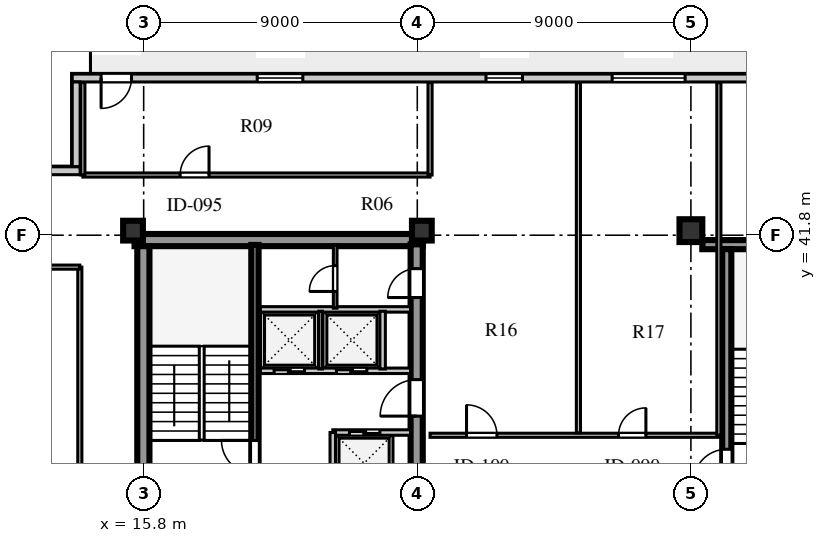
"""IFC4 building model, lengths in metres.
Left out: names, types, materials, properties, quantities, classifications, styles, units other than length and angle.
Written with IfcOpenShell. Run it as: python <this file> out.ifc"""

import sys

from ifc_helpers import new_model, si_unit, direction, frame, frame_2d, origin, origin_2d, place, context, subcontext, project, spatial, rectangle, extrude, element, fill, save


model = new_model("IFC4")
c1 = context("Model", 3, precision=1e-05, world=origin(), true_north=direction((0.0, 1.0)))
c2 = subcontext(c1, "Body", "Model", "MODEL_VIEW")
j1 = project(units=[si_unit("LENGTHUNIT", "METRE"), si_unit("PLANEANGLEUNIT", "RADIAN")], contexts=[c1])
p1 = place(None, origin())
s1 = spatial("IfcSite", under=j1, at=p1, CompositionType="ELEMENT")
p2 = place(p1, origin())
s2 = spatial("IfcBuilding", under=s1, at=p2, CompositionType="ELEMENT")
p3 = place(p2, frame((0.0, 0.0, 296.0)))
s3 = spatial("IfcBuildingStorey", under=s2, at=p3, CompositionType="ELEMENT", Elevation=296.0)
p4 = place(p3, frame((15.5, 41.64, 0.0), z_axis=(0.0, 0.0, 1.0), x_axis=(1.0, 0.0, 0.0)))
e1 = element("IfcWall", 1, at=p4, inside=s3, PredefinedType="SHEAR", context=c2, shape_type="SweptSolid", body=[
    extrude(rectangle(XDim=9.48, YDim=0.4, at=frame_2d((4.74, 0.0))), origin(), (0.0, 0.0, 1.0), 3.66),
])
p5 = place(p3, frame((15.79, 15.81, 0.0), z_axis=(0.0, 0.0, 1.0), x_axis=(0.0, 1.0, 0.0)))
e2 = element("IfcWall", 2, at=p5, inside=s3, PredefinedType="SHEAR", context=c2, shape_type="SweptSolid", body=[
    extrude(rectangle(XDim=25.63, YDim=0.4, at=frame_2d((12.815, 0.0))), origin(), (0.0, 0.0, 1.0), 3.66),
])
p6 = place(p3, frame((24.78, 15.74, 0.0), z_axis=(0.0, 0.0, 1.0), x_axis=(0.0, 1.0, 0.0)))
e3 = element("IfcWall", 3, at=p6, inside=s3, PredefinedType="SHEAR", context=c2, shape_type="SweptSolid", body=[
    extrude(rectangle(XDim=25.76, YDim=0.4, at=frame_2d((12.88, 0.0))), origin(), (0.0, 0.0, 1.0), 3.66),
])
p7 = place(p6, frame((1.61, 0.0, 0.0)))
e4 = element("IfcOpeningElement", 4, at=p7, cuts=e3, PredefinedType="OPENING", context=c2, shape_type="SweptSolid", body=[
    extrude(rectangle(XDim=1.2, YDim=2.1, at=frame_2d((0.6, 1.05))), frame((0.0, 0.21, 0.0), z_axis=(0.0, -1.0, 0.0), x_axis=(1.0, 0.0, 0.0)), (0.0, 0.0, 1.0), 0.42),
])
p8 = place(p6, frame((6.78, 0.0, 0.0)))
e5 = element("IfcOpeningElement", 5, at=p8, cuts=e3, PredefinedType="OPENING", context=c2, shape_type="SweptSolid", body=[
    extrude(rectangle(XDim=0.85, YDim=2.06, at=frame_2d((0.425, 1.03))), frame((0.0, 0.21, 0.0), z_axis=(0.0, -1.0, 0.0), x_axis=(1.0, 0.0, 0.0)), (0.0, 0.0, 1.0), 0.42),
])
p9 = place(p6, frame((12.11, 0.0, 0.0)))
e6 = element("IfcOpeningElement", 6, at=p9, cuts=e3, PredefinedType="OPENING", context=c2, shape_type="SweptSolid", body=[
    extrude(rectangle(XDim=1.5, YDim=2.12, at=frame_2d((0.75, 1.06))), frame((0.0, 0.21, 0.0), z_axis=(0.0, -1.0, 0.0), x_axis=(1.0, 0.0, 0.0)), (0.0, 0.0, 1.0), 0.42),
])
p10 = place(p6, frame((20.11, 0.0, 0.0)))
e7 = element("IfcOpeningElement", 7, at=p10, cuts=e3, PredefinedType="OPENING", context=c2, shape_type="SweptSolid", body=[
    extrude(rectangle(XDim=1.2, YDim=2.12, at=frame_2d((0.6, 1.06))), frame((0.0, 0.21, 0.0), z_axis=(0.0, -1.0, 0.0), x_axis=(1.0, 0.0, 0.0)), (0.0, 0.0, 1.0), 0.42),
])
p11 = place(p6, frame((24.01, 0.0, 0.0)))
e8 = element("IfcOpeningElement", 8, at=p11, cuts=e3, PredefinedType="OPENING", context=c2, shape_type="SweptSolid", body=[
    extrude(rectangle(XDim=0.95, YDim=2.1, at=frame_2d((0.475, 1.05))), frame((0.0, 0.21, 0.0), z_axis=(0.0, -1.0, 0.0), x_axis=(1.0, 0.0, 0.0)), (0.0, 0.0, 1.0), 0.42),
])
p12 = place(p3, frame((34.175, 41.49, 0.0), z_axis=(0.0, 0.0, 1.0), x_axis=(1.0, 0.0, 0.0)))
e9 = element("IfcWall", 9, at=p12, inside=s3, PredefinedType="SHEAR", context=c2, shape_type="SweptSolid", body=[
    extrude(rectangle(XDim=4.695, YDim=0.3, at=frame_2d((2.348, 0.0))), origin(), (0.0, 0.0, 1.0), 3.66),
])
p13 = place(p3, frame((34.98, 33.31, 0.0), z_axis=(0.0, 0.0, 1.0), x_axis=(0.0, 1.0, 0.0)))
e10 = element("IfcWall", 10, at=p13, inside=s3, PredefinedType="SHEAR", context=c2, shape_type="SweptSolid", body=[
    extrude(rectangle(XDim=8.03, YDim=0.3, at=frame_2d((4.015, 0.0))), origin(), (0.0, 0.0, 1.0), 3.66),
])
p14 = place(p13, frame((0.35, 0.0, 0.0)))
e11 = element("IfcOpeningElement", 11, at=p14, cuts=e10, PredefinedType="OPENING", context=c2, shape_type="SweptSolid", body=[
    extrude(rectangle(XDim=1.1, YDim=2.1, at=frame_2d((0.55, 1.05))), frame((0.0, 0.16, 0.0), z_axis=(0.0, -1.0, 0.0), x_axis=(1.0, 0.0, 0.0)), (0.0, 0.0, 1.0), 0.32),
])
for number, where, z_axis, x_axis in (
    (12, (15.45, 41.95, 0.0), (0.0, 0.0, 1.0), (1.0, 0.0, 0.0)),
    (13, (24.95, 41.95, 0.0), (0.0, 0.0, 1.0), (1.0, 0.0, 0.0)),
):
    element("IfcColumn", number, at=place(p3, frame(where, z_axis=z_axis, x_axis=x_axis)), inside=s3, PredefinedType="COLUMN", context=c2, shape_type="SweptSolid", body=[
        extrude(rectangle(XDim=0.65, YDim=0.65, at=origin_2d()), origin(), (0.0, 0.0, 1.0), 3.66),
    ])
p15 = place(p3, frame((33.8, 41.95, 0.0), z_axis=(0.0, 0.0, 1.0), x_axis=(1.0, 0.0, 0.0)))
e14 = element("IfcColumn", 14, at=p15, inside=s3, PredefinedType="COLUMN", context=c2, shape_type="SweptSolid", body=[
    extrude(rectangle(XDim=0.75, YDim=0.75, at=origin_2d()), origin(), (0.0, 0.0, 1.0), 3.66),
])
p16 = place(p3, frame((45.15, 46.97, 0.0), z_axis=(0.0, 0.0, 1.0), x_axis=(-1.0, 0.0, 0.0)))
e15 = element("IfcWall", 15, at=p16, inside=s3, PredefinedType="SOLIDWALL", context=c2, shape_type="SweptSolid", body=[
    extrude(rectangle(XDim=31.7, YDim=0.26, at=frame_2d((15.85, 0.0))), origin(), (0.0, 0.0, 1.0), 3.66),
])
p17 = place(p16, frame((29.75, 0.0, 0.0)))
e16 = element("IfcOpeningElement", 16, at=p17, cuts=e15, PredefinedType="OPENING", context=c2, shape_type="SweptSolid", body=[
    extrude(rectangle(XDim=1.0, YDim=2.05, at=frame_2d((0.5, 1.025))), frame((0.0, 0.14, 0.0), z_axis=(0.0, -1.0, 0.0), x_axis=(1.0, 0.0, 0.0)), (0.0, 0.0, 1.0), 0.28),
])
p18 = place(p16, frame((24.115, 0.0, 0.8)))
e17 = element("IfcOpeningElement", 17, at=p18, cuts=e15, PredefinedType="OPENING", context=c2, shape_type="SweptSolid", body=[
    extrude(rectangle(XDim=1.5, YDim=2.0, at=frame_2d((0.75, 1.0))), frame((0.0, 0.14, 0.0), z_axis=(0.0, -1.0, 0.0), x_axis=(1.0, 0.0, 0.0)), (0.0, 0.0, 1.0), 0.28),
])
p19 = place(p16, frame((16.89, 0.0, 0.8)))
e18 = element("IfcOpeningElement", 18, at=p19, cuts=e15, PredefinedType="OPENING", context=c2, shape_type="SweptSolid", body=[
    extrude(rectangle(XDim=1.2, YDim=1.75, at=frame_2d((0.6, 0.875))), frame((0.0, 0.14, 0.0), z_axis=(0.0, -1.0, 0.0), x_axis=(1.0, 0.0, 0.0)), (0.0, 0.0, 1.0), 0.28),
])
p20 = place(p16, frame((11.54, 0.0, 0.8)))
e19 = element("IfcOpeningElement", 19, at=p20, cuts=e15, PredefinedType="OPENING", context=c2, shape_type="SweptSolid", body=[
    extrude(rectangle(XDim=2.4, YDim=2.05, at=frame_2d((1.2, 1.025))), frame((0.0, 0.14, 0.0), z_axis=(0.0, -1.0, 0.0), x_axis=(1.0, 0.0, 0.0)), (0.0, 0.0, 1.0), 0.28),
])
p21 = place(p16, frame((4.22, 0.0, 0.8)))
e20 = element("IfcOpeningElement", 20, at=p21, cuts=e15, PredefinedType="OPENING", context=c2, shape_type="SweptSolid", body=[
    extrude(rectangle(XDim=2.1, YDim=1.95, at=frame_2d((1.05, 0.975))), frame((0.0, 0.14, 0.0), z_axis=(0.0, -1.0, 0.0), x_axis=(1.0, 0.0, 0.0)), (0.0, 0.0, 1.0), 0.28),
])
p22 = place(p3, frame((13.58, 46.84, 0.0), z_axis=(0.0, 0.0, 1.0), x_axis=(0.0, -1.0, 0.0)))
e21 = element("IfcWall", 21, at=p22, inside=s3, PredefinedType="SOLIDWALL", context=c2, shape_type="SweptSolid", body=[
    extrude(rectangle(XDim=2.79, YDim=0.26, at=frame_2d((1.395, 0.0))), origin(), (0.0, 0.0, 1.0), 3.66),
])
p23 = place(p3, frame((13.71, 43.92, 0.0), z_axis=(0.0, 0.0, 1.0), x_axis=(-1.0, 0.0, 0.0)))
e22 = element("IfcWall", 22, at=p23, inside=s3, PredefinedType="SOLIDWALL", context=c2, shape_type="SweptSolid", body=[
    extrude(rectangle(XDim=3.31, YDim=0.26, at=frame_2d((1.655, 0.0))), origin(), (0.0, 0.0, 1.0), 3.66),
])
p24 = place(p3, frame((19.46, 33.3, 0.0), z_axis=(0.0, 0.0, 1.0), x_axis=(0.0, 1.0, 0.0)))
e23 = element("IfcWall", 23, at=p24, inside=s3, PredefinedType="SHEAR", context=c2, shape_type="SweptSolid", body=[
    extrude(rectangle(XDim=8.18, YDim=0.24, at=frame_2d((4.09, 0.0))), origin(), (0.0, 0.0, 1.0), 3.9),
])
p25 = place(p24, frame((0.65, 0.0, 0.0)))
e24 = element("IfcOpeningElement", 24, at=p25, cuts=e23, PredefinedType="OPENING", context=c2, shape_type="SweptSolid", body=[
    extrude(rectangle(XDim=1.1, YDim=2.1, at=frame_2d((0.55, 1.05))), frame((0.0, 0.13, 0.0), z_axis=(0.0, -1.0, 0.0), x_axis=(1.0, 0.0, 0.0)), (0.0, 0.0, 1.0), 0.26),
])
p26 = place(p3, frame((22.02, 35.31, 0.0), z_axis=(0.0, 0.0, 1.0), x_axis=(1.0, 0.0, 0.0)))
e25 = element("IfcWall", 25, at=p26, inside=s3, PredefinedType="SOLIDWALL", context=c2, shape_type="SweptSolid", body=[
    extrude(rectangle(XDim=2.56, YDim=0.18, at=frame_2d((1.28, 0.0))), origin(), (0.0, 0.0, 1.0), 3.66),
])
p27 = place(p26, frame((0.55, 0.0, 0.0)))
e26 = element("IfcOpeningElement", 26, at=p27, cuts=e25, PredefinedType="OPENING", context=c2, shape_type="SweptSolid", body=[
    extrude(rectangle(XDim=1.0, YDim=2.1, at=frame_2d((0.5, 1.05))), frame((0.0, 0.1, 0.0), z_axis=(0.0, -1.0, 0.0), x_axis=(1.0, 0.0, 0.0)), (0.0, 0.0, 1.0), 0.2),
])
p28 = place(p3, frame((22.02, 33.3, 0.0), z_axis=(0.0, 0.0, 1.0), x_axis=(0.0, 1.0, 0.0)))
e27 = element("IfcWall", 27, at=p28, inside=s3, PredefinedType="SOLIDWALL", context=c2, shape_type="SweptSolid", body=[
    extrude(rectangle(XDim=2.01, YDim=0.18, at=frame_2d((1.005, 0.0))), origin(), (0.0, 0.0, 1.0), 3.66),
])
p29 = place(p3, frame((19.64, 37.34, 0.0), z_axis=(0.0, 0.0, 1.0), x_axis=(1.0, 0.0, 0.0)))
e28 = element("IfcWall", 28, at=p29, inside=s3, PredefinedType="SOLIDWALL", context=c2, shape_type="SweptSolid", body=[
    extrude(rectangle(XDim=4.94, YDim=0.18, at=frame_2d((2.47, 0.0))), origin(), (0.0, 0.0, 1.0), 3.66),
])
p30 = place(p29, frame((0.45, 0.0, 0.0)))
e29 = element("IfcOpeningElement", 29, at=p30, cuts=e28, PredefinedType="OPENING", context=c2, shape_type="SweptSolid", body=[
    extrude(rectangle(XDim=1.0, YDim=2.1, at=frame_2d((0.5, 1.05))), frame((0.0, 0.1, 0.0), z_axis=(0.0, -1.0, 0.0), x_axis=(1.0, 0.0, 0.0)), (0.0, 0.0, 1.0), 0.2),
])
p31 = place(p29, frame((2.5, 0.0, 0.0)))
e30 = element("IfcOpeningElement", 30, at=p31, cuts=e28, PredefinedType="OPENING", context=c2, shape_type="SweptSolid", body=[
    extrude(rectangle(XDim=1.0, YDim=2.1, at=frame_2d((0.5, 1.05))), frame((0.0, 0.1, 0.0), z_axis=(0.0, -1.0, 0.0), x_axis=(1.0, 0.0, 0.0)), (0.0, 0.0, 1.0), 0.2),
])
p32 = place(p3, frame((19.64, 39.36, 0.0), z_axis=(0.0, 0.0, 1.0), x_axis=(1.0, 0.0, 0.0)))
e31 = element("IfcWall", 31, at=p32, inside=s3, PredefinedType="SOLIDWALL", context=c2, shape_type="SweptSolid", body=[
    extrude(rectangle(XDim=4.94, YDim=0.18, at=frame_2d((2.47, 0.0))), origin(), (0.0, 0.0, 1.0), 3.66),
])
p33 = place(p3, frame((21.62, 37.4, 0.0), z_axis=(0.0, 0.0, 1.0), x_axis=(0.0, 1.0, 0.0)))
e32 = element("IfcWall", 32, at=p33, inside=s3, PredefinedType="PARTITIONING", context=c2, shape_type="SweptSolid", body=[
    extrude(rectangle(XDim=1.9, YDim=0.12, at=frame_2d((0.95, 0.0))), origin(), (0.0, 0.0, 1.0), 3.66),
])
p34 = place(p3, frame((23.66, 37.4, 0.0), z_axis=(0.0, 0.0, 1.0), x_axis=(0.0, 1.0, 0.0)))
e33 = element("IfcWall", 33, at=p34, inside=s3, PredefinedType="SOLIDWALL", context=c2, shape_type="SweptSolid", body=[
    extrude(rectangle(XDim=1.9, YDim=0.18, at=frame_2d((0.95, 0.0))), origin(), (0.0, 0.0, 1.0), 3.66),
])
p35 = place(p3, frame((22.1, 39.4, 0.0), z_axis=(0.0, 0.0, 1.0), x_axis=(0.0, 1.0, 0.0)))
e34 = element("IfcWall", 34, at=p35, inside=s3, PredefinedType="PARTITIONING", context=c2, shape_type="SweptSolid", body=[
    extrude(rectangle(XDim=2.08, YDim=0.12, at=frame_2d((1.04, 0.0))), origin(), (0.0, 0.0, 1.0), 3.66),
])
p36 = place(p35, frame((0.55, 0.0, 0.0)))
e35 = element("IfcOpeningElement", 35, at=p36, cuts=e34, PredefinedType="OPENING", context=c2, shape_type="SweptSolid", body=[
    extrude(rectangle(XDim=0.85, YDim=2.06, at=frame_2d((0.425, 1.03))), frame((0.0, 0.07, 0.0), z_axis=(0.0, -1.0, 0.0), x_axis=(1.0, 0.0, 0.0)), (0.0, 0.0, 1.0), 0.14),
])
p37 = place(p3, frame((25.22, 35.22, 0.0), z_axis=(0.0, 0.0, 1.0), x_axis=(1.0, 0.0, 0.0)))
e36 = element("IfcWall", 36, at=p37, inside=s3, PredefinedType="PARTITIONING", context=c2, shape_type="SweptSolid", body=[
    extrude(rectangle(XDim=9.5, YDim=0.135, at=frame_2d((4.75, 0.0))), origin(), (0.0, 0.0, 1.0), 3.66),
])
p38 = place(p37, frame((1.2, 0.0, 0.0)))
e37 = element("IfcOpeningElement", 37, at=p38, cuts=e36, PredefinedType="OPENING", context=c2, shape_type="SweptSolid", body=[
    extrude(rectangle(XDim=1.0, YDim=2.08, at=frame_2d((0.5, 1.04))), frame((0.0, 0.078, 0.0), z_axis=(0.0, -1.0, 0.0), x_axis=(1.0, 0.0, 0.0)), (0.0, 0.0, 1.0), 0.155),
])
p39 = place(p37, frame((6.2, 0.0, 0.0)))
e38 = element("IfcOpeningElement", 38, at=p39, cuts=e36, PredefinedType="OPENING", context=c2, shape_type="SweptSolid", body=[
    extrude(rectangle(XDim=0.9, YDim=2.08, at=frame_2d((0.45, 1.04))), frame((0.0, 0.078, 0.0), z_axis=(0.0, -1.0, 0.0), x_axis=(1.0, 0.0, 0.0)), (0.0, 0.0, 1.0), 0.155),
])
p40 = place(p3, frame((13.8, 43.78, 0.0), z_axis=(0.0, 0.0, 1.0), x_axis=(1.0, 0.0, 0.0)))
e39 = element("IfcWall", 39, at=p40, inside=s3, PredefinedType="PARTITIONING", context=c2, shape_type="SweptSolid", body=[
    extrude(rectangle(XDim=11.42, YDim=0.135, at=frame_2d((5.71, 0.0))), origin(), (0.0, 0.0, 1.0), 3.66),
])
p41 = place(p40, frame((3.2, 0.0, 0.0)))
e40 = element("IfcOpeningElement", 40, at=p41, cuts=e39, PredefinedType="OPENING", context=c2, shape_type="SweptSolid", body=[
    extrude(rectangle(XDim=0.95, YDim=2.08, at=frame_2d((0.475, 1.04))), frame((0.0, 0.078, 0.0), z_axis=(0.0, -1.0, 0.0), x_axis=(1.0, 0.0, 0.0)), (0.0, 0.0, 1.0), 0.155),
])
p42 = place(p3, frame((13.8, 43.78, 0.0), z_axis=(0.0, 0.0, 1.0), x_axis=(0.0, 1.0, 0.0)))
e41 = element("IfcWall", 41, at=p42, inside=s3, PredefinedType="PARTITIONING", context=c2, shape_type="SweptSolid", body=[
    extrude(rectangle(XDim=3.04, YDim=0.135, at=frame_2d((1.52, 0.0))), origin(), (0.0, 0.0, 1.0), 3.66),
])
p43 = place(p3, frame((25.22, 43.78, 0.0), z_axis=(0.0, 0.0, 1.0), x_axis=(0.0, 1.0, 0.0)))
e42 = element("IfcWall", 42, at=p43, inside=s3, PredefinedType="PARTITIONING", context=c2, shape_type="SweptSolid", body=[
    extrude(rectangle(XDim=3.04, YDim=0.135, at=frame_2d((1.52, 0.0))), origin(), (0.0, 0.0, 1.0), 3.21),
])
p44 = place(p3, frame((13.7, 16.45, 0.0), z_axis=(0.0, 0.0, 1.0), x_axis=(0.0, 1.0, 0.0)))
e43 = element("IfcWall", 43, at=p44, inside=s3, PredefinedType="PARTITIONING", context=c2, shape_type="SweptSolid", body=[
    extrude(rectangle(XDim=24.3, YDim=0.135, at=frame_2d((12.15, 0.0))), origin(), (0.0, 0.0, 1.0), 3.66),
])
p45 = place(p44, frame((5.1, 0.0, 0.0)))
e44 = element("IfcOpeningElement", 44, at=p45, cuts=e43, PredefinedType="OPENING", context=c2, shape_type="SweptSolid", body=[
    extrude(rectangle(XDim=0.95, YDim=2.08, at=frame_2d((0.475, 1.04))), frame((0.0, 0.078, 0.0), z_axis=(0.0, -1.0, 0.0), x_axis=(1.0, 0.0, 0.0)), (0.0, 0.0, 1.0), 0.155),
])
p46 = place(p3, frame((10.68, 40.75, 0.0), z_axis=(0.0, 0.0, 1.0), x_axis=(1.0, 0.0, 0.0)))
e45 = element("IfcWall", 45, at=p46, inside=s3, PredefinedType="PARTITIONING", context=c2, shape_type="SweptSolid", body=[
    extrude(rectangle(XDim=3.02, YDim=0.135, at=frame_2d((1.51, 0.0))), origin(), (0.0, 0.0, 1.0), 3.66),
])
p47 = place(p3, frame((34.72, 35.22, 0.0), z_axis=(0.0, 0.0, 1.0), x_axis=(0.0, 1.0, 0.0)))
e46 = element("IfcWall", 46, at=p47, inside=s3, PredefinedType="PARTITIONING", context=c2, shape_type="SweptSolid", body=[
    extrude(rectangle(XDim=11.6, YDim=0.135, at=frame_2d((5.8, 0.0))), origin(), (0.0, 0.0, 1.0), 3.66),
])
p48 = place(p3, frame((30.1, 35.3, 0.0), z_axis=(0.0, 0.0, 1.0), x_axis=(0.0, 1.0, 0.0)))
e47 = element("IfcWall", 47, at=p48, inside=s3, PredefinedType="PARTITIONING", context=c2, shape_type="SweptSolid", body=[
    extrude(rectangle(XDim=11.52, YDim=0.135, at=frame_2d((5.76, 0.0))), origin(), (0.0, 0.0, 1.0), 3.66),
])
p49 = place(p17, frame((1.0, 0.0, 0.0), z_axis=(0.0, 0.0, 1.0), x_axis=(-1.0, 0.0, 0.0)))
e48 = element("IfcDoor", 48, at=p49, inside=s3, OperationType="SINGLE_SWING_LEFT", PredefinedType="DOOR", context=c2, shape_type="SweptSolid", body=[
    extrude(rectangle(XDim=1.0, YDim=2.05, at=frame_2d((0.5, 1.025))), frame((0.0, 0.025, 0.0), z_axis=(0.0, -1.0, 0.0), x_axis=(1.0, 0.0, 0.0)), (0.0, 0.0, 1.0), 0.05),
])
fill(e16, e48)
p50 = place(p18, origin())
e49 = element("IfcWindow", 49, at=p50, inside=s3, PartitioningType="SINGLE_PANEL", PredefinedType="WINDOW", context=c2, shape_type="SweptSolid", body=[
    extrude(rectangle(XDim=1.5, YDim=2.0, at=frame_2d((0.75, 1.0))), frame((0.0, 0.03, 0.0), z_axis=(0.0, -1.0, 0.0), x_axis=(1.0, 0.0, 0.0)), (0.0, 0.0, 1.0), 0.06),
])
fill(e17, e49)
p51 = place(p19, origin())
e50 = element("IfcWindow", 50, at=p51, inside=s3, PartitioningType="SINGLE_PANEL", PredefinedType="WINDOW", context=c2, shape_type="SweptSolid", body=[
    extrude(rectangle(XDim=1.2, YDim=1.75, at=frame_2d((0.6, 0.875))), frame((0.0, 0.03, 0.0), z_axis=(0.0, -1.0, 0.0), x_axis=(1.0, 0.0, 0.0)), (0.0, 0.0, 1.0), 0.06),
])
fill(e18, e50)
p52 = place(p20, origin())
e51 = element("IfcWindow", 51, at=p52, inside=s3, PartitioningType="SINGLE_PANEL", PredefinedType="WINDOW", context=c2, shape_type="SweptSolid", body=[
    extrude(rectangle(XDim=2.4, YDim=2.05, at=frame_2d((1.2, 1.025))), frame((0.0, 0.03, 0.0), z_axis=(0.0, -1.0, 0.0), x_axis=(1.0, 0.0, 0.0)), (0.0, 0.0, 1.0), 0.06),
])
fill(e19, e51)
p53 = place(p25, origin())
e52 = element("IfcDoor", 52, at=p53, inside=s3, OperationType="SINGLE_SWING_RIGHT", PredefinedType="DOOR", context=c2, shape_type="SweptSolid", body=[
    extrude(rectangle(XDim=1.1, YDim=2.1, at=frame_2d((0.55, 1.05))), frame((0.0, 0.025, 0.0), z_axis=(0.0, -1.0, 0.0), x_axis=(1.0, 0.0, 0.0)), (0.0, 0.0, 1.0), 0.05),
])
fill(e24, e52)
p54 = place(p10, frame((1.2, 0.0, 0.0), z_axis=(0.0, 0.0, 1.0), x_axis=(-1.0, 0.0, 0.0)))
e53 = element("IfcDoor", 53, at=p54, inside=s3, OperationType="SINGLE_SWING_RIGHT", PredefinedType="DOOR", context=c2, shape_type="SweptSolid", body=[
    extrude(rectangle(XDim=1.2, YDim=2.12, at=frame_2d((0.6, 1.06))), frame((0.0, 0.025, 0.0), z_axis=(0.0, -1.0, 0.0), x_axis=(1.0, 0.0, 0.0)), (0.0, 0.0, 1.0), 0.05),
])
fill(e7, e53)
p55 = place(p30, frame((1.0, 0.0, 0.0), z_axis=(0.0, 0.0, 1.0), x_axis=(-1.0, 0.0, 0.0)))
e54 = element("IfcDoor", 54, at=p55, inside=s3, OperationType="DOUBLE_DOOR_SLIDING", PredefinedType="DOOR", context=c2, shape_type="SweptSolid", body=[
    extrude(rectangle(XDim=1.0, YDim=2.1, at=frame_2d((0.5, 1.05))), frame((0.0, 0.025, 0.0), z_axis=(0.0, -1.0, 0.0), x_axis=(1.0, 0.0, 0.0)), (0.0, 0.0, 1.0), 0.05),
])
fill(e29, e54)
p56 = place(p31, frame((1.0, 0.0, 0.0), z_axis=(0.0, 0.0, 1.0), x_axis=(-1.0, 0.0, 0.0)))
e55 = element("IfcDoor", 55, at=p56, inside=s3, OperationType="DOUBLE_DOOR_SLIDING", PredefinedType="DOOR", context=c2, shape_type="SweptSolid", body=[
    extrude(rectangle(XDim=1.0, YDim=2.1, at=frame_2d((0.5, 1.05))), frame((0.0, 0.025, 0.0), z_axis=(0.0, -1.0, 0.0), x_axis=(1.0, 0.0, 0.0)), (0.0, 0.0, 1.0), 0.05),
])
fill(e30, e55)
p57 = place(p27, origin())
e56 = element("IfcDoor", 56, at=p57, inside=s3, OperationType="DOUBLE_DOOR_SLIDING", PredefinedType="DOOR", context=c2, shape_type="SweptSolid", body=[
    extrude(rectangle(XDim=1.0, YDim=2.1, at=frame_2d((0.5, 1.05))), frame((0.0, 0.025, 0.0), z_axis=(0.0, -1.0, 0.0), x_axis=(1.0, 0.0, 0.0)), (0.0, 0.0, 1.0), 0.05),
])
fill(e26, e56)
p58 = place(p36, origin())
e57 = element("IfcDoor", 57, at=p58, inside=s3, OperationType="SINGLE_SWING_LEFT", PredefinedType="DOOR", context=c2, shape_type="SweptSolid", body=[
    extrude(rectangle(XDim=0.85, YDim=2.06, at=frame_2d((0.425, 1.03))), frame((0.0, 0.025, 0.0), z_axis=(0.0, -1.0, 0.0), x_axis=(1.0, 0.0, 0.0)), (0.0, 0.0, 1.0), 0.05),
])
fill(e35, e57)
p59 = place(p11, frame((0.95, 0.0, 0.0), z_axis=(0.0, 0.0, 1.0), x_axis=(-1.0, 0.0, 0.0)))
e58 = element("IfcDoor", 58, at=p59, inside=s3, OperationType="SINGLE_SWING_RIGHT", PredefinedType="DOOR", context=c2, shape_type="SweptSolid", body=[
    extrude(rectangle(XDim=0.95, YDim=2.1, at=frame_2d((0.475, 1.05))), frame((0.0, 0.025, 0.0), z_axis=(0.0, -1.0, 0.0), x_axis=(1.0, 0.0, 0.0)), (0.0, 0.0, 1.0), 0.05),
])
fill(e8, e58)
p60 = place(p14, origin())
e59 = element("IfcDoor", 59, at=p60, inside=s3, OperationType="SINGLE_SWING_LEFT", PredefinedType="DOOR", context=c2, shape_type="SweptSolid", body=[
    extrude(rectangle(XDim=1.1, YDim=2.1, at=frame_2d((0.55, 1.05))), frame((0.0, 0.025, 0.0), z_axis=(0.0, -1.0, 0.0), x_axis=(1.0, 0.0, 0.0)), (0.0, 0.0, 1.0), 0.05),
])
fill(e11, e59)
p61 = place(p41, origin())
e60 = element("IfcDoor", 60, at=p61, inside=s3, OperationType="SINGLE_SWING_RIGHT", PredefinedType="DOOR", context=c2, shape_type="SweptSolid", body=[
    extrude(rectangle(XDim=0.95, YDim=2.08, at=frame_2d((0.475, 1.04))), frame((0.0, 0.025, 0.0), z_axis=(0.0, -1.0, 0.0), x_axis=(1.0, 0.0, 0.0)), (0.0, 0.0, 1.0), 0.05),
])
fill(e40, e60)
p62 = place(p38, origin())
e61 = element("IfcDoor", 61, at=p62, inside=s3, OperationType="SINGLE_SWING_LEFT", PredefinedType="DOOR", context=c2, shape_type="SweptSolid", body=[
    extrude(rectangle(XDim=1.0, YDim=2.08, at=frame_2d((0.5, 1.04))), frame((0.0, 0.025, 0.0), z_axis=(0.0, -1.0, 0.0), x_axis=(1.0, 0.0, 0.0)), (0.0, 0.0, 1.0), 0.05),
])
fill(e37, e61)
p63 = place(p39, origin())
e62 = element("IfcDoor", 62, at=p63, inside=s3, OperationType="SINGLE_SWING_RIGHT", PredefinedType="DOOR", context=c2, shape_type="SweptSolid", body=[
    extrude(rectangle(XDim=0.9, YDim=2.08, at=frame_2d((0.45, 1.04))), frame((0.0, 0.025, 0.0), z_axis=(0.0, -1.0, 0.0), x_axis=(1.0, 0.0, 0.0)), (0.0, 0.0, 1.0), 0.05),
])
fill(e38, e62)
save(model, sys.argv[1])
